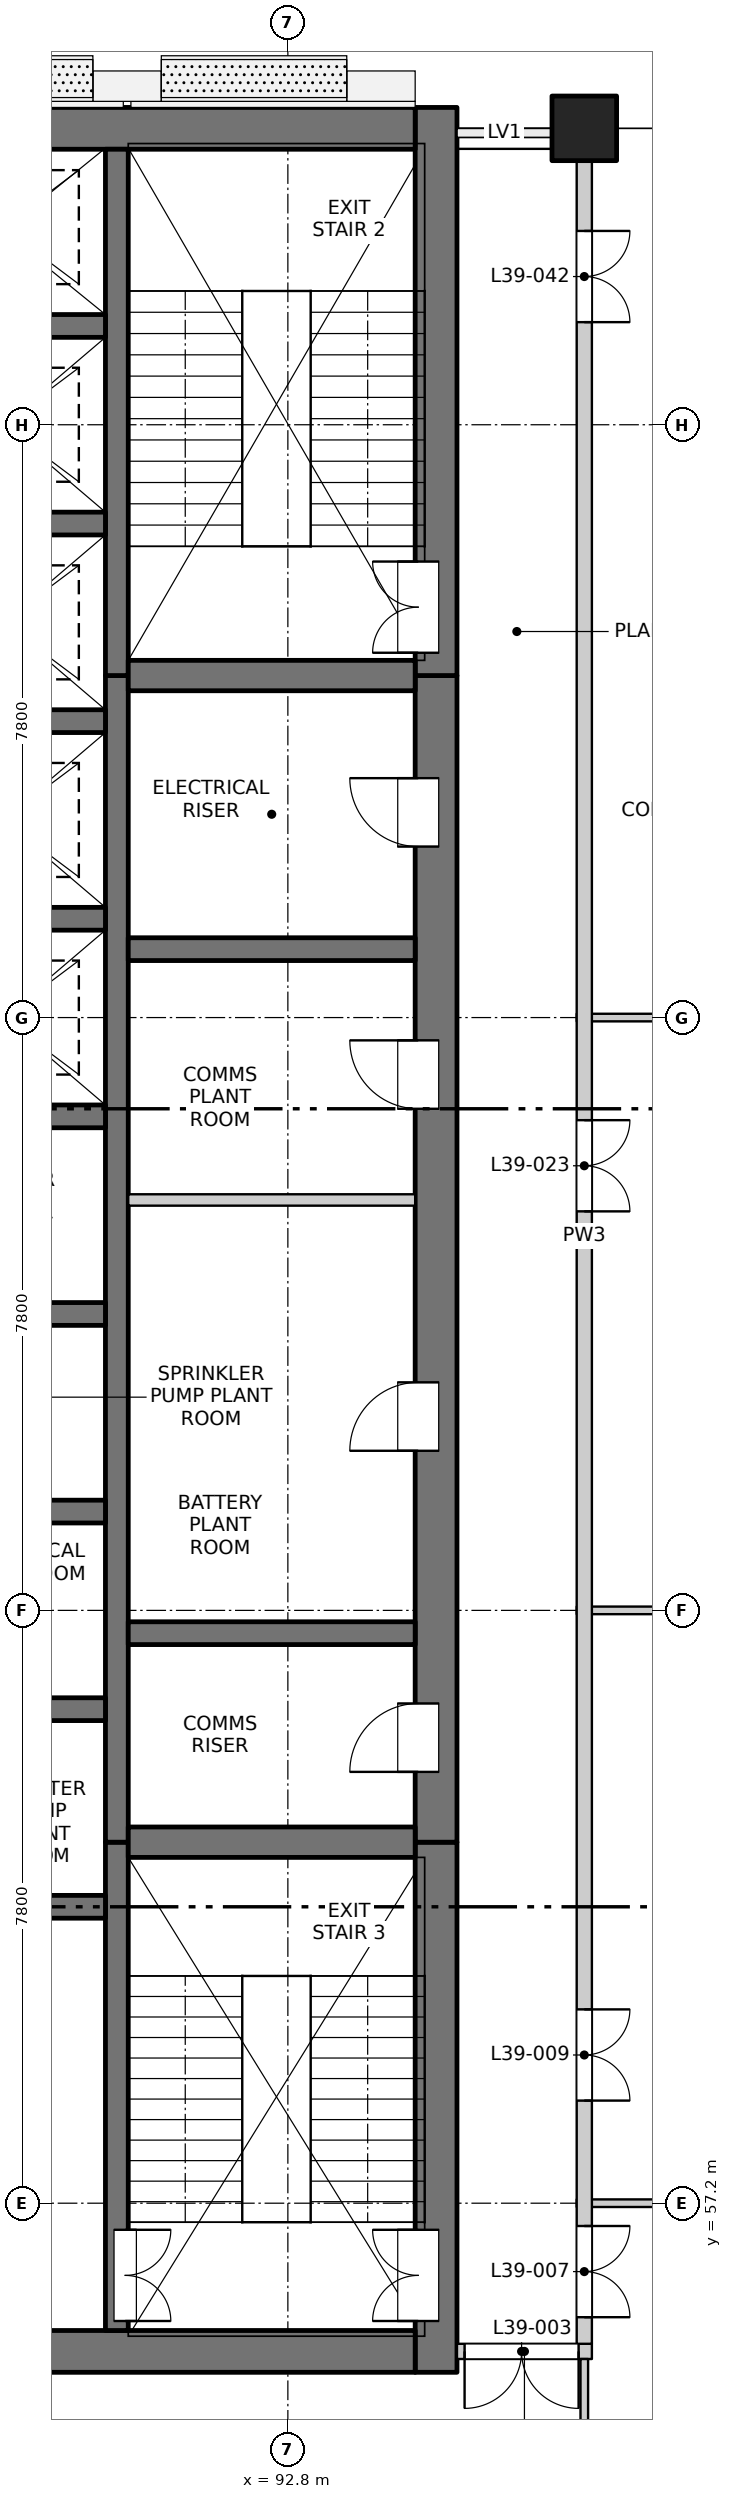
"""IFC4 building model, lengths in metres.
Left out: names, types, materials, properties, quantities, classifications, styles, units other than length and angle.
Written with IfcOpenShell. Run it as: python <this file> out.ifc"""

import sys

from ifc_helpers import new_model, si_unit, direction, frame, frame_2d, origin, origin_2d, place, context, subcontext, project, spatial, rectangle, extrude, element, fill, save


model = new_model("IFC4")
c1 = context("Model", 3, precision=1e-05, world=origin(), true_north=direction((0.0, 1.0)))
c2 = subcontext(c1, "Body", "Model", "MODEL_VIEW")
j1 = project(units=[si_unit("LENGTHUNIT", "METRE"), si_unit("PLANEANGLEUNIT", "RADIAN")], contexts=[c1])
p1 = place(None, origin())
s1 = spatial("IfcSite", under=j1, at=p1, CompositionType="ELEMENT")
p2 = place(p1, origin())
s2 = spatial("IfcBuilding", under=s1, at=p2, CompositionType="ELEMENT")
p3 = place(p2, frame((0.0, 0.0, 144.1)))
s3 = spatial("IfcBuildingStorey", under=s2, at=p3, CompositionType="ELEMENT", Elevation=144.1)
p4 = place(p3, frame((96.7, 84.5, -0.3), z_axis=(0.0, 0.0, 1.0), x_axis=(1.0, 0.0, 0.0)))
e1 = element("IfcColumn", 1, at=p4, inside=s3, PredefinedType="COLUMN", context=c2, shape_type="SweptSolid", body=[
    extrude(rectangle(XDim=0.85, YDim=0.85, at=origin_2d()), origin(), (0.0, 0.0, 1.0), 4.5),
])
p5 = place(p3, frame((94.75, 54.975, -0.3), z_axis=(0.0, 0.0, 1.0), x_axis=(0.0, 1.0, 0.0)))
e2 = element("IfcWall", 2, at=p5, inside=s3, PredefinedType="SOLIDWALL", context=c2, shape_type="SweptSolid", body=[
    extrude(rectangle(XDim=6.975, YDim=0.55, at=frame_2d((3.487, 0.0))), origin(), (0.0, 0.0, 1.0), 4.5),
])
p6 = place(p5, frame((0.675, 0.0, 0.3)))
e3 = element("IfcOpeningElement", 3, at=p6, cuts=e2, PredefinedType="OPENING", context=c2, shape_type="SweptSolid", body=[
    extrude(rectangle(XDim=1.2, YDim=2.1, at=frame_2d((0.6, 1.05))), frame((0.0, 0.285, 0.0), z_axis=(0.0, -1.0, 0.0), x_axis=(1.0, 0.0, 0.0)), (0.0, 0.0, 1.0), 0.57),
])
p7 = place(p3, frame((94.75, 61.95, -0.3), z_axis=(0.0, 0.0, 1.0), x_axis=(0.0, 1.0, 0.0)))
e4 = element("IfcWall", 4, at=p7, inside=s3, PredefinedType="SOLIDWALL", context=c2, shape_type="SweptSolid", body=[
    extrude(rectangle(XDim=15.35, YDim=0.55, at=frame_2d((7.675, 0.0))), origin(), (0.0, 0.0, 1.0), 4.5),
])
p8 = place(p7, frame((0.925, 0.0, 0.3)))
e5 = element("IfcOpeningElement", 5, at=p8, cuts=e4, PredefinedType="OPENING", context=c2, shape_type="SweptSolid", body=[
    extrude(rectangle(XDim=0.9, YDim=2.1, at=frame_2d((0.45, 1.05))), frame((0.0, 0.285, 0.0), z_axis=(0.0, -1.0, 0.0), x_axis=(1.0, 0.0, 0.0)), (0.0, 0.0, 1.0), 0.57),
])
p9 = place(p7, frame((5.15, 0.0, 0.3)))
e6 = element("IfcOpeningElement", 6, at=p9, cuts=e4, PredefinedType="OPENING", context=c2, shape_type="SweptSolid", body=[
    extrude(rectangle(XDim=0.9, YDim=2.1, at=frame_2d((0.45, 1.05))), frame((0.0, 0.285, 0.0), z_axis=(0.0, -1.0, 0.0), x_axis=(1.0, 0.0, 0.0)), (0.0, 0.0, 1.0), 0.57),
])
p10 = place(p7, frame((9.65, 0.0, 0.3)))
e7 = element("IfcOpeningElement", 7, at=p10, cuts=e4, PredefinedType="OPENING", context=c2, shape_type="SweptSolid", body=[
    extrude(rectangle(XDim=0.9, YDim=2.1, at=frame_2d((0.45, 1.05))), frame((0.0, 0.285, 0.0), z_axis=(0.0, -1.0, 0.0), x_axis=(1.0, 0.0, 0.0)), (0.0, 0.0, 1.0), 0.57),
])
p11 = place(p7, frame((13.1, 0.0, 0.3)))
e8 = element("IfcOpeningElement", 8, at=p11, cuts=e4, PredefinedType="OPENING", context=c2, shape_type="SweptSolid", body=[
    extrude(rectangle(XDim=0.9, YDim=2.1, at=frame_2d((0.45, 1.05))), frame((0.0, 0.285, 0.0), z_axis=(0.0, -1.0, 0.0), x_axis=(1.0, 0.0, 0.0)), (0.0, 0.0, 1.0), 0.57),
])
p12 = place(p3, frame((94.75, 77.3, -0.3), z_axis=(0.0, 0.0, 1.0), x_axis=(0.0, 1.0, 0.0)))
e9 = element("IfcWall", 9, at=p12, inside=s3, PredefinedType="SOLIDWALL", context=c2, shape_type="SweptSolid", body=[
    extrude(rectangle(XDim=7.475, YDim=0.55, at=frame_2d((3.737, 0.0))), origin(), (0.0, 0.0, 1.0), 4.5),
])
p13 = place(p12, frame((0.3, 0.0, 0.3)))
e10 = element("IfcOpeningElement", 10, at=p13, cuts=e9, PredefinedType="OPENING", context=c2, shape_type="SweptSolid", body=[
    extrude(rectangle(XDim=1.2, YDim=2.1, at=frame_2d((0.6, 1.05))), frame((0.0, 0.285, 0.0), z_axis=(0.0, -1.0, 0.0), x_axis=(1.0, 0.0, 0.0)), (0.0, 0.0, 1.0), 0.57),
])
p14 = place(p3, frame((75.525, 55.25, -0.3), z_axis=(0.0, 0.0, 1.0), x_axis=(1.0, 0.0, 0.0)))
e11 = element("IfcWall", 11, at=p14, inside=s3, PredefinedType="SOLIDWALL", context=c2, shape_type="SweptSolid", body=[
    extrude(rectangle(XDim=18.95, YDim=0.55, at=frame_2d((9.475, 0.0))), origin(), (0.0, 0.0, 1.0), 4.5),
])
p15 = place(p14, frame((7.225, 0.0, 0.3)))
e12 = element("IfcOpeningElement", 12, at=p15, cuts=e11, PredefinedType="OPENING", context=c2, shape_type="SweptSolid", body=[
    extrude(rectangle(XDim=1.5, YDim=2.1, at=frame_2d((0.75, 1.05))), frame((0.0, 0.285, 0.0), z_axis=(0.0, -1.0, 0.0), x_axis=(1.0, 0.0, 0.0)), (0.0, 0.0, 1.0), 0.57),
])
p16 = place(p3, frame((75.525, 84.5, -0.3), z_axis=(0.0, 0.0, 1.0), x_axis=(1.0, 0.0, 0.0)))
e13 = element("IfcWall", 13, at=p16, inside=s3, PredefinedType="SOLIDWALL", context=c2, shape_type="SweptSolid", body=[
    extrude(rectangle(XDim=18.95, YDim=0.55, at=frame_2d((9.475, 0.0))), origin(), (0.0, 0.0, 1.0), 4.5),
])
p17 = place(p3, frame((90.55, 55.525, -0.3), z_axis=(0.0, 0.0, 1.0), x_axis=(0.0, 1.0, 0.0)))
e14 = element("IfcWall", 14, at=p17, inside=s3, PredefinedType="SOLIDWALL", context=c2, shape_type="SweptSolid", body=[
    extrude(rectangle(XDim=6.425, YDim=0.3, at=frame_2d((3.212, 0.0))), origin(), (0.0, 0.0, 1.0), 4.5),
])
p18 = place(p17, frame((0.125, 0.0, 0.3)))
e15 = element("IfcOpeningElement", 15, at=p18, cuts=e14, PredefinedType="OPENING", context=c2, shape_type="SweptSolid", body=[
    extrude(rectangle(XDim=1.2, YDim=2.1, at=frame_2d((0.6, 1.05))), frame((0.0, 0.16, 0.0), z_axis=(0.0, -1.0, 0.0), x_axis=(1.0, 0.0, 0.0)), (0.0, 0.0, 1.0), 0.32),
])
p19 = place(p3, frame((90.55, 61.95, -0.3), z_axis=(0.0, 0.0, 1.0), x_axis=(0.0, 1.0, 0.0)))
e16 = element("IfcWall", 16, at=p19, inside=s3, PredefinedType="SOLIDWALL", context=c2, shape_type="SweptSolid", body=[
    extrude(rectangle(XDim=15.35, YDim=0.3, at=frame_2d((7.675, 0.0))), origin(), (0.0, 0.0, 1.0), 4.5),
])
p20 = place(p3, frame((90.55, 77.3, -0.3), z_axis=(0.0, 0.0, 1.0), x_axis=(0.0, 1.0, 0.0)))
e17 = element("IfcWall", 17, at=p20, inside=s3, PredefinedType="SOLIDWALL", context=c2, shape_type="SweptSolid", body=[
    extrude(rectangle(XDim=6.925, YDim=0.3, at=frame_2d((3.462, 0.0))), origin(), (0.0, 0.0, 1.0), 4.5),
])
for number, where, z_axis, x_axis in (
    (18, (87.4, 61.1, -0.3), (0.0, 0.0, 1.0), (1.0, 0.0, 0.0)),
    (19, (87.4, 63.7, -0.3), (0.0, 0.0, 1.0), (1.0, 0.0, 0.0)),
    (20, (87.4, 66.3, -0.3), (0.0, 0.0, 1.0), (1.0, 0.0, 0.0)),
    (21, (87.4, 68.9, -0.3), (0.0, 0.0, 1.0), (1.0, 0.0, 0.0)),
    (22, (87.4, 71.5, -0.3), (0.0, 0.0, 1.0), (1.0, 0.0, 0.0)),
    (23, (87.4, 74.1, -0.3), (0.0, 0.0, 1.0), (1.0, 0.0, 0.0)),
    (24, (87.4, 76.7, -0.3), (0.0, 0.0, 1.0), (1.0, 0.0, 0.0)),
    (25, (87.4, 79.3, -0.3), (0.0, 0.0, 1.0), (1.0, 0.0, 0.0)),
    (26, (87.4, 81.9, -0.3), (0.0, 0.0, 1.0), (1.0, 0.0, 0.0)),
):
    element("IfcWall", number, at=place(p3, frame(where, z_axis=z_axis, x_axis=x_axis)), inside=s3, PredefinedType="SOLIDWALL", context=c2, shape_type="SweptSolid", body=[
        extrude(rectangle(XDim=3.0, YDim=0.3, at=frame_2d((1.5, 0.0))), origin(), (0.0, 0.0, 1.0), 4.5),
    ])
p21 = place(p3, frame((90.7, 61.95, -0.3), z_axis=(0.0, 0.0, 1.0), x_axis=(1.0, 0.0, 0.0)))
e27 = element("IfcWall", 27, at=p21, inside=s3, PredefinedType="SOLIDWALL", context=c2, shape_type="SweptSolid", body=[
    extrude(rectangle(XDim=3.775, YDim=0.4, at=frame_2d((1.888, 0.0))), origin(), (0.0, 0.0, 1.0), 4.5),
])
for number, where, z_axis, x_axis in (
    (28, (90.7, 64.7, -0.3), (0.0, 0.0, 1.0), (1.0, 0.0, 0.0)),
    (29, (90.7, 73.7, -0.3), (0.0, 0.0, 1.0), (1.0, 0.0, 0.0)),
):
    element("IfcWall", number, at=place(p3, frame(where, z_axis=z_axis, x_axis=x_axis)), inside=s3, PredefinedType="SOLIDWALL", context=c2, shape_type="SweptSolid", body=[
        extrude(rectangle(XDim=3.775, YDim=0.3, at=frame_2d((1.888, 0.0))), origin(), (0.0, 0.0, 1.0), 4.5),
    ])
p22 = place(p3, frame((90.7, 77.3, -0.3), z_axis=(0.0, 0.0, 1.0), x_axis=(1.0, 0.0, 0.0)))
e30 = element("IfcWall", 30, at=p22, inside=s3, PredefinedType="SOLIDWALL", context=c2, shape_type="SweptSolid", body=[
    extrude(rectangle(XDim=3.775, YDim=0.4, at=frame_2d((1.888, 0.0))), origin(), (0.0, 0.0, 1.0), 4.5),
])
p23 = place(p3, frame((95.025, 55.25, 0.0), z_axis=(0.0, 0.0, 1.0), x_axis=(1.0, 0.0, 0.0)))
e31 = element("IfcWall", 31, at=p23, inside=s3, PredefinedType="PARTITIONING", context=c2, shape_type="SweptSolid", body=[
    extrude(rectangle(XDim=1.775, YDim=0.2, at=frame_2d((0.887, 0.0))), origin(), (0.0, 0.0, 1.0), 4.2),
])
p24 = place(p23, frame((0.1, 0.0, 0.0)))
e32 = element("IfcOpeningElement", 32, at=p24, cuts=e31, PredefinedType="OPENING", context=c2, shape_type="SweptSolid", body=[
    extrude(rectangle(XDim=1.5, YDim=2.1, at=frame_2d((0.75, 1.05))), frame((0.0, 0.11, 0.0), z_axis=(0.0, -1.0, 0.0), x_axis=(1.0, 0.0, 0.0)), (0.0, 0.0, 1.0), 0.22),
])
for number, where, z_axis, x_axis in (
    (33, (96.6, 57.2, 0.0), (0.0, 0.0, 1.0), (1.0, 0.0, 0.0)),
    (34, (96.6, 65.0, 0.0), (0.0, 0.0, 1.0), (1.0, 0.0, 0.0)),
):
    element("IfcWall", number, at=place(p3, frame(where, z_axis=z_axis, x_axis=x_axis)), inside=s3, PredefinedType="PARTITIONING", context=c2, shape_type="SweptSolid", body=[
        extrude(rectangle(XDim=7.9, YDim=0.1, at=frame_2d((3.95, 0.0))), origin(), (0.0, 0.0, 1.0), 4.2),
    ])
p25 = place(p3, frame((90.7, 70.4, 0.0), z_axis=(0.0, 0.0, 1.0), x_axis=(1.0, 0.0, 0.0)))
e35 = element("IfcWall", 35, at=p25, inside=s3, PredefinedType="PARTITIONING", context=c2, shape_type="SweptSolid", body=[
    extrude(rectangle(XDim=3.775, YDim=0.15, at=frame_2d((1.887, 0.0))), origin(), (0.0, 0.0, 1.0), 4.2),
])
p26 = place(p3, frame((96.6, 72.8, 0.0), z_axis=(0.0, 0.0, 1.0), x_axis=(1.0, 0.0, 0.0)))
e36 = element("IfcWall", 36, at=p26, inside=s3, PredefinedType="PARTITIONING", context=c2, shape_type="SweptSolid", body=[
    extrude(rectangle(XDim=7.9, YDim=0.1, at=frame_2d((3.95, 0.0))), origin(), (0.0, 0.0, 1.0), 4.2),
])
p27 = place(p3, frame((96.7, 45.5, 0.0), z_axis=(0.0, 0.0, 1.0), x_axis=(0.0, 1.0, 0.0)))
e37 = element("IfcWall", 37, at=p27, inside=s3, PredefinedType="PARTITIONING", context=c2, shape_type="SweptSolid", body=[
    extrude(rectangle(XDim=9.65, YDim=0.1, at=frame_2d((4.825, 0.0))), origin(), (0.0, 0.0, 1.0), 4.2),
])
p28 = place(p3, frame((96.7, 55.35, 0.0), z_axis=(0.0, 0.0, 1.0), x_axis=(0.0, 1.0, 0.0)))
e38 = element("IfcWall", 38, at=p28, inside=s3, PredefinedType="PARTITIONING", context=c2, shape_type="SweptSolid", body=[
    extrude(rectangle(XDim=29.15, YDim=0.2, at=frame_2d((14.575, 0.0))), origin(), (0.0, 0.0, 1.0), 4.2),
])
p29 = place(p28, frame((0.35, 0.0, 0.0)))
e39 = element("IfcOpeningElement", 39, at=p29, cuts=e38, PredefinedType="OPENING", context=c2, shape_type="SweptSolid", body=[
    extrude(rectangle(XDim=1.2, YDim=2.1, at=frame_2d((0.6, 1.05))), frame((0.0, 0.11, 0.0), z_axis=(0.0, -1.0, 0.0), x_axis=(1.0, 0.0, 0.0)), (0.0, 0.0, 1.0), 0.22),
])
p30 = place(p28, frame((3.2, 0.0, 0.0)))
e40 = element("IfcOpeningElement", 40, at=p30, cuts=e38, PredefinedType="OPENING", context=c2, shape_type="SweptSolid", body=[
    extrude(rectangle(XDim=1.2, YDim=2.1, at=frame_2d((0.6, 1.05))), frame((0.0, 0.11, 0.0), z_axis=(0.0, -1.0, 0.0), x_axis=(1.0, 0.0, 0.0)), (0.0, 0.0, 1.0), 0.22),
])
p31 = place(p28, frame((14.9, 0.0, 0.0)))
e41 = element("IfcOpeningElement", 41, at=p31, cuts=e38, PredefinedType="OPENING", context=c2, shape_type="SweptSolid", body=[
    extrude(rectangle(XDim=1.2, YDim=2.1, at=frame_2d((0.6, 1.05))), frame((0.0, 0.11, 0.0), z_axis=(0.0, -1.0, 0.0), x_axis=(1.0, 0.0, 0.0)), (0.0, 0.0, 1.0), 0.22),
])
p32 = place(p28, frame((26.6, 0.0, 0.0)))
e42 = element("IfcOpeningElement", 42, at=p32, cuts=e38, PredefinedType="OPENING", context=c2, shape_type="SweptSolid", body=[
    extrude(rectangle(XDim=1.2, YDim=2.1, at=frame_2d((0.6, 1.05))), frame((0.0, 0.11, 0.0), z_axis=(0.0, -1.0, 0.0), x_axis=(1.0, 0.0, 0.0)), (0.0, 0.0, 1.0), 0.22),
])
p33 = place(p24, origin())
e43 = element("IfcDoor", 43, at=p33, inside=s3, OperationType="DOUBLE_DOOR_SINGLE_SWING", PredefinedType="DOOR", context=c2, shape_type="SweptSolid", body=[
    extrude(rectangle(XDim=1.5, YDim=2.1, at=frame_2d((0.75, 1.05))), frame((0.0, 0.025, 0.0), z_axis=(0.0, -1.0, 0.0), x_axis=(1.0, 0.0, 0.0)), (0.0, 0.0, 1.0), 0.05),
])
fill(e32, e43)
p34 = place(p18, origin())
e44 = element("IfcDoor", 44, at=p34, inside=s3, OperationType="DOUBLE_DOOR_SINGLE_SWING", PredefinedType="DOOR", context=c2, shape_type="SweptSolid", body=[
    extrude(rectangle(XDim=1.2, YDim=2.1, at=frame_2d((0.6, 1.05))), frame((0.0, -0.085, 0.0), z_axis=(0.0, -1.0, 0.0), x_axis=(1.0, 0.0, 0.0)), (0.0, 0.0, 1.0), 0.05),
])
fill(e15, e44)
p35 = place(p6, origin())
e45 = element("IfcDoor", 45, at=p35, inside=s3, OperationType="DOUBLE_DOOR_SINGLE_SWING", PredefinedType="DOOR", context=c2, shape_type="SweptSolid", body=[
    extrude(rectangle(XDim=1.2, YDim=2.1, at=frame_2d((0.6, 1.05))), frame((0.0, 0.26, 0.0), z_axis=(0.0, -1.0, 0.0), x_axis=(1.0, 0.0, 0.0)), (0.0, 0.0, 1.0), 0.05),
])
fill(e3, e45)
p36 = place(p29, origin())
e46 = element("IfcDoor", 46, at=p36, inside=s3, OperationType="DOUBLE_DOOR_SINGLE_SWING", PredefinedType="DOOR", context=c2, shape_type="SweptSolid", body=[
    extrude(rectangle(XDim=1.2, YDim=2.1, at=frame_2d((0.6, 1.05))), frame((0.0, 0.025, 0.0), z_axis=(0.0, -1.0, 0.0), x_axis=(1.0, 0.0, 0.0)), (0.0, 0.0, 1.0), 0.05),
])
fill(e39, e46)
p37 = place(p30, origin())
e47 = element("IfcDoor", 47, at=p37, inside=s3, OperationType="DOUBLE_DOOR_SINGLE_SWING", PredefinedType="DOOR", context=c2, shape_type="SweptSolid", body=[
    extrude(rectangle(XDim=1.2, YDim=2.1, at=frame_2d((0.6, 1.05))), frame((0.0, 0.025, 0.0), z_axis=(0.0, -1.0, 0.0), x_axis=(1.0, 0.0, 0.0)), (0.0, 0.0, 1.0), 0.05),
])
fill(e40, e47)
p38 = place(p8, origin())
e48 = element("IfcDoor", 48, at=p38, inside=s3, OperationType="SINGLE_SWING_LEFT", PredefinedType="DOOR", context=c2, shape_type="SweptSolid", body=[
    extrude(rectangle(XDim=0.9, YDim=2.1, at=frame_2d((0.45, 1.05))), frame((0.0, 0.26, 0.0), z_axis=(0.0, -1.0, 0.0), x_axis=(1.0, 0.0, 0.0)), (0.0, 0.0, 1.0), 0.05),
])
fill(e5, e48)
p39 = place(p9, origin())
e49 = element("IfcDoor", 49, at=p39, inside=s3, OperationType="SINGLE_SWING_LEFT", PredefinedType="DOOR", context=c2, shape_type="SweptSolid", body=[
    extrude(rectangle(XDim=0.9, YDim=2.1, at=frame_2d((0.45, 1.05))), frame((0.0, 0.26, 0.0), z_axis=(0.0, -1.0, 0.0), x_axis=(1.0, 0.0, 0.0)), (0.0, 0.0, 1.0), 0.05),
])
fill(e6, e49)
p40 = place(p31, origin())
e50 = element("IfcDoor", 50, at=p40, inside=s3, OperationType="DOUBLE_DOOR_SINGLE_SWING", PredefinedType="DOOR", context=c2, shape_type="SweptSolid", body=[
    extrude(rectangle(XDim=1.2, YDim=2.1, at=frame_2d((0.6, 1.05))), frame((0.0, 0.025, 0.0), z_axis=(0.0, -1.0, 0.0), x_axis=(1.0, 0.0, 0.0)), (0.0, 0.0, 1.0), 0.05),
])
fill(e41, e50)
p41 = place(p10, origin())
e51 = element("IfcDoor", 51, at=p41, inside=s3, OperationType="SINGLE_SWING_RIGHT", PredefinedType="DOOR", context=c2, shape_type="SweptSolid", body=[
    extrude(rectangle(XDim=0.9, YDim=2.1, at=frame_2d((0.45, 1.05))), frame((0.0, 0.26, 0.0), z_axis=(0.0, -1.0, 0.0), x_axis=(1.0, 0.0, 0.0)), (0.0, 0.0, 1.0), 0.05),
])
fill(e7, e51)
p42 = place(p11, origin())
e52 = element("IfcDoor", 52, at=p42, inside=s3, OperationType="SINGLE_SWING_RIGHT", PredefinedType="DOOR", context=c2, shape_type="SweptSolid", body=[
    extrude(rectangle(XDim=0.9, YDim=2.1, at=frame_2d((0.45, 1.05))), frame((0.0, 0.26, 0.0), z_axis=(0.0, -1.0, 0.0), x_axis=(1.0, 0.0, 0.0)), (0.0, 0.0, 1.0), 0.05),
])
fill(e8, e52)
p43 = place(p13, origin())
e53 = element("IfcDoor", 53, at=p43, inside=s3, OperationType="DOUBLE_DOOR_SINGLE_SWING", PredefinedType="DOOR", context=c2, shape_type="SweptSolid", body=[
    extrude(rectangle(XDim=1.2, YDim=2.1, at=frame_2d((0.6, 1.05))), frame((0.0, 0.26, 0.0), z_axis=(0.0, -1.0, 0.0), x_axis=(1.0, 0.0, 0.0)), (0.0, 0.0, 1.0), 0.05),
])
fill(e10, e53)
p44 = place(p32, origin())
e54 = element("IfcDoor", 54, at=p44, inside=s3, OperationType="DOUBLE_DOOR_SINGLE_SWING", PredefinedType="DOOR", context=c2, shape_type="SweptSolid", body=[
    extrude(rectangle(XDim=1.2, YDim=2.1, at=frame_2d((0.6, 1.05))), frame((0.0, 0.025, 0.0), z_axis=(0.0, -1.0, 0.0), x_axis=(1.0, 0.0, 0.0)), (0.0, 0.0, 1.0), 0.05),
])
fill(e42, e54)
save(model, sys.argv[1])
